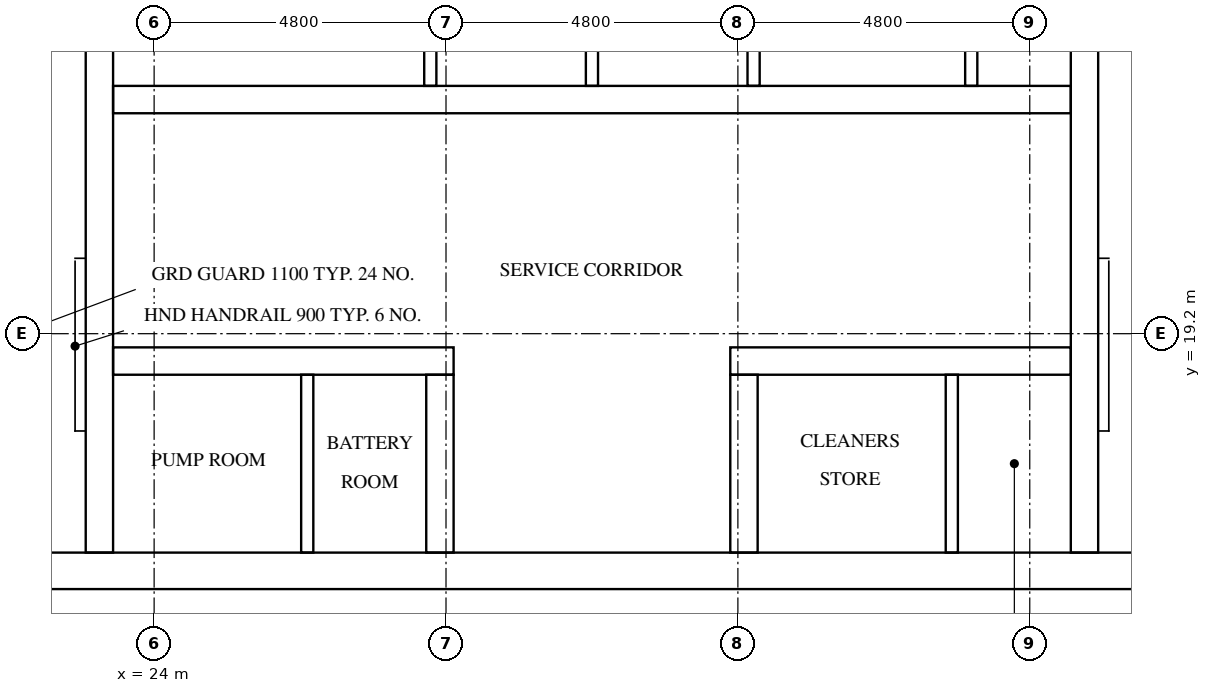
"""IFC4 building model, lengths in metres.
Left out: names, types, materials, properties, quantities, classifications, styles, units other than length and angle.
Written with IfcOpenShell. Run it as: python <this file> out.ifc"""

import sys

from ifc_helpers import new_model, si_unit, direction, frame, frame_2d, origin, place, context, subcontext, project, spatial, rectangle, extrude, element, fill, save


model = new_model("IFC4")
c1 = context("Model", 3, precision=1e-05, world=origin(), true_north=direction((0.0, 1.0)))
c2 = subcontext(c1, "Body", "Model", "MODEL_VIEW")
j1 = project(units=[si_unit("LENGTHUNIT", "METRE"), si_unit("PLANEANGLEUNIT", "RADIAN")], contexts=[c1])
p1 = place(None, origin())
s1 = spatial("IfcSite", under=j1, at=p1, CompositionType="ELEMENT")
p2 = place(p1, origin())
s2 = spatial("IfcBuilding", under=s1, at=p2, CompositionType="ELEMENT")
p3 = place(p2, frame((0.0, 0.0, 259.7)))
s3 = spatial("IfcBuildingStorey", under=s2, at=p3, CompositionType="ELEMENT", Elevation=259.7)
p4 = place(p3, frame((15.0, 15.3, 0.0), z_axis=(0.0, 0.0, 1.0), x_axis=(1.0, 0.0, 0.0)))
e1 = element("IfcWall", 1, at=p4, inside=s3, PredefinedType="SHEAR", context=c2, shape_type="SweptSolid", body=[
    extrude(rectangle(XDim=32.4, YDim=0.6, at=frame_2d((16.2, 0.0))), origin(), (0.0, 0.0, 1.0), 3.1),
])
p5 = place(p4, frame((15.3, 0.0, 0.0)))
e2 = element("IfcOpeningElement", 2, at=p5, cuts=e1, PredefinedType="OPENING", context=c2, shape_type="SweptSolid", body=[
    extrude(rectangle(XDim=1.8, YDim=2.1, at=frame_2d((0.9, 1.05))), frame((0.0, 0.31, 0.0), z_axis=(0.0, -1.0, 0.0), x_axis=(1.0, 0.0, 0.0)), (0.0, 0.0, 1.0), 0.62),
])
p6 = place(p3, frame((23.1, 15.6, 0.0), z_axis=(0.0, 0.0, 1.0), x_axis=(0.0, 1.0, 0.0)))
e3 = element("IfcWall", 3, at=p6, inside=s3, PredefinedType="SHEAR", context=c2, shape_type="SweptSolid", body=[
    extrude(rectangle(XDim=21.6, YDim=0.45, at=frame_2d((10.8, 0.0))), origin(), (0.0, 0.0, 1.0), 3.1),
])
p7 = place(p3, frame((39.3, 15.6, 0.0), z_axis=(0.0, 0.0, 1.0), x_axis=(0.0, 1.0, 0.0)))
e4 = element("IfcWall", 4, at=p7, inside=s3, PredefinedType="SHEAR", context=c2, shape_type="SweptSolid", body=[
    extrude(rectangle(XDim=8.65, YDim=0.45, at=frame_2d((4.325, 0.0))), origin(), (0.0, 0.0, 1.0), 3.1),
])
p8 = place(p3, frame((23.325, 18.75, 0.0), z_axis=(0.0, 0.0, 1.0), x_axis=(1.0, 0.0, 0.0)))
e5 = element("IfcWall", 5, at=p8, inside=s3, PredefinedType="SHEAR", context=c2, shape_type="SweptSolid", body=[
    extrude(rectangle(XDim=5.6, YDim=0.45, at=frame_2d((2.8, 0.0))), origin(), (0.0, 0.0, 1.0), 3.1),
])
p9 = place(p8, frame((1.046, 0.0, 0.0)))
e6 = element("IfcOpeningElement", 6, at=p9, cuts=e5, PredefinedType="OPENING", context=c2, shape_type="SweptSolid", body=[
    extrude(rectangle(XDim=1.0, YDim=2.1, at=frame_2d((0.5, 1.05))), frame((0.0, 0.235, 0.0), z_axis=(0.0, -1.0, 0.0), x_axis=(1.0, 0.0, 0.0)), (0.0, 0.0, 1.0), 0.47),
])
p10 = place(p8, frame((3.721, 0.0, 0.0)))
e7 = element("IfcOpeningElement", 7, at=p10, cuts=e5, PredefinedType="OPENING", context=c2, shape_type="SweptSolid", body=[
    extrude(rectangle(XDim=1.0, YDim=2.1, at=frame_2d((0.5, 1.05))), frame((0.0, 0.235, 0.0), z_axis=(0.0, -1.0, 0.0), x_axis=(1.0, 0.0, 0.0)), (0.0, 0.0, 1.0), 0.47),
])
p11 = place(p3, frame((33.475, 18.75, 0.0), z_axis=(0.0, 0.0, 1.0), x_axis=(1.0, 0.0, 0.0)))
e8 = element("IfcWall", 8, at=p11, inside=s3, PredefinedType="SHEAR", context=c2, shape_type="SweptSolid", body=[
    extrude(rectangle(XDim=5.6, YDim=0.45, at=frame_2d((2.8, 0.0))), origin(), (0.0, 0.0, 1.0), 3.1),
])
p12 = place(p11, frame((1.497, 0.0, 0.0)))
e9 = element("IfcOpeningElement", 9, at=p12, cuts=e8, PredefinedType="OPENING", context=c2, shape_type="SweptSolid", body=[
    extrude(rectangle(XDim=1.0, YDim=2.1, at=frame_2d((0.5, 1.05))), frame((0.0, 0.235, 0.0), z_axis=(0.0, -1.0, 0.0), x_axis=(1.0, 0.0, 0.0)), (0.0, 0.0, 1.0), 0.47),
])
p13 = place(p11, frame((4.171, 0.0, 0.0)))
e10 = element("IfcOpeningElement", 10, at=p13, cuts=e8, PredefinedType="OPENING", context=c2, shape_type="SweptSolid", body=[
    extrude(rectangle(XDim=1.0, YDim=2.1, at=frame_2d((0.5, 1.05))), frame((0.0, 0.235, 0.0), z_axis=(0.0, -1.0, 0.0), x_axis=(1.0, 0.0, 0.0)), (0.0, 0.0, 1.0), 0.47),
])
p14 = place(p3, frame((23.325, 23.05, 0.0), z_axis=(0.0, 0.0, 1.0), x_axis=(1.0, 0.0, 0.0)))
e11 = element("IfcWall", 11, at=p14, inside=s3, PredefinedType="SHEAR", context=c2, shape_type="SweptSolid", body=[
    extrude(rectangle(XDim=15.75, YDim=0.45, at=frame_2d((7.875, 0.0))), origin(), (0.0, 0.0, 1.0), 3.1),
])
p15 = place(p14, frame((2.058, 0.0, 0.0)))
e12 = element("IfcOpeningElement", 12, at=p15, cuts=e11, PredefinedType="OPENING", context=c2, shape_type="SweptSolid", body=[
    extrude(rectangle(XDim=1.0, YDim=2.1, at=frame_2d((0.5, 1.05))), frame((0.0, 0.235, 0.0), z_axis=(0.0, -1.0, 0.0), x_axis=(1.0, 0.0, 0.0)), (0.0, 0.0, 1.0), 0.47),
])
p16 = place(p14, frame((11.823, 0.0, 0.0)))
e13 = element("IfcOpeningElement", 13, at=p16, cuts=e11, PredefinedType="OPENING", context=c2, shape_type="SweptSolid", body=[
    extrude(rectangle(XDim=1.0, YDim=2.1, at=frame_2d((0.5, 1.05))), frame((0.0, 0.235, 0.0), z_axis=(0.0, -1.0, 0.0), x_axis=(1.0, 0.0, 0.0)), (0.0, 0.0, 1.0), 0.47),
])
p17 = place(p14, frame((14.481, 0.0, 0.0)))
e14 = element("IfcOpeningElement", 14, at=p17, cuts=e11, PredefinedType="OPENING", context=c2, shape_type="SweptSolid", body=[
    extrude(rectangle(XDim=1.0, YDim=2.1, at=frame_2d((0.5, 1.05))), frame((0.0, 0.235, 0.0), z_axis=(0.0, -1.0, 0.0), x_axis=(1.0, 0.0, 0.0)), (0.0, 0.0, 1.0), 0.47),
])
for number, where, z_axis, x_axis in (
    (15, (28.7, 15.6, 0.0), (0.0, 0.0, 1.0), (0.0, 1.0, 0.0)),
    (16, (33.7, 15.6, 0.0), (0.0, 0.0, 1.0), (0.0, 1.0, 0.0)),
):
    element("IfcWall", number, at=place(p3, frame(where, z_axis=z_axis, x_axis=x_axis)), inside=s3, PredefinedType="SHEAR", context=c2, shape_type="SweptSolid", body=[
        extrude(rectangle(XDim=2.925, YDim=0.45, at=frame_2d((1.462, 0.0))), origin(), (0.0, 0.0, 1.0), 3.1),
    ])
for number, where, z_axis, x_axis in (
    (17, (28.542, 23.275, 0.0), (0.0, 0.0, 1.0), (0.0, 1.0, 0.0)),
    (18, (31.2, 23.275, 0.0), (0.0, 0.0, 1.0), (0.0, 1.0, 0.0)),
    (19, (33.858, 23.275, 0.0), (0.0, 0.0, 1.0), (0.0, 1.0, 0.0)),
):
    element("IfcWall", number, at=place(p3, frame(where, z_axis=z_axis, x_axis=x_axis)), inside=s3, PredefinedType="SOLIDWALL", context=c2, shape_type="SweptSolid", body=[
        extrude(rectangle(XDim=2.65, YDim=0.2, at=frame_2d((1.325, 0.0))), origin(), (0.0, 0.0, 1.0), 3.1),
    ])
p18 = place(p3, frame((37.438, 23.275, 0.0), z_axis=(0.0, 0.0, 1.0), x_axis=(0.0, 1.0, 0.0)))
e20 = element("IfcWall", 20, at=p18, inside=s3, PredefinedType="PARTITIONING", context=c2, shape_type="SweptSolid", body=[
    extrude(rectangle(XDim=2.65, YDim=0.2, at=frame_2d((1.325, 0.0))), origin(), (0.0, 0.0, 1.0), 3.1),
])
for number, where, z_axis, x_axis in (
    (21, (26.518, 15.6, 0.0), (0.0, 0.0, 1.0), (0.0, 1.0, 0.0)),
    (22, (37.118, 15.6, 0.0), (0.0, 0.0, 1.0), (0.0, 1.0, 0.0)),
):
    element("IfcWall", number, at=place(p3, frame(where, z_axis=z_axis, x_axis=x_axis)), inside=s3, PredefinedType="PARTITIONING", context=c2, shape_type="SweptSolid", body=[
        extrude(rectangle(XDim=2.925, YDim=0.2, at=frame_2d((1.462, 0.0))), origin(), (0.0, 0.0, 1.0), 3.1),
    ])
p19 = place(p5, frame((1.8, 0.0, 0.0), z_axis=(0.0, 0.0, 1.0), x_axis=(-1.0, 0.0, 0.0)))
e23 = element("IfcDoor", 23, at=p19, inside=s3, OperationType="DOUBLE_DOOR_SINGLE_SWING", PredefinedType="DOOR", context=c2, shape_type="SweptSolid", body=[
    extrude(rectangle(XDim=1.8, YDim=2.1, at=frame_2d((0.9, 1.05))), frame((0.0, 0.025, 0.0), z_axis=(0.0, -1.0, 0.0), x_axis=(1.0, 0.0, 0.0)), (0.0, 0.0, 1.0), 0.05),
])
fill(e2, e23)
p20 = place(p15, frame((1.0, 0.0, 0.0), z_axis=(0.0, 0.0, 1.0), x_axis=(-1.0, 0.0, 0.0)))
e24 = element("IfcDoor", 24, at=p20, inside=s3, OperationType="SINGLE_SWING_LEFT", PredefinedType="DOOR", context=c2, shape_type="SweptSolid", body=[
    extrude(rectangle(XDim=1.0, YDim=2.1, at=frame_2d((0.5, 1.05))), frame((0.0, 0.025, 0.0), z_axis=(0.0, -1.0, 0.0), x_axis=(1.0, 0.0, 0.0)), (0.0, 0.0, 1.0), 0.05),
])
fill(e12, e24)
p21 = place(p16, frame((1.0, 0.0, 0.0), z_axis=(0.0, 0.0, 1.0), x_axis=(-1.0, 0.0, 0.0)))
e25 = element("IfcDoor", 25, at=p21, inside=s3, OperationType="SINGLE_SWING_RIGHT", PredefinedType="DOOR", context=c2, shape_type="SweptSolid", body=[
    extrude(rectangle(XDim=1.0, YDim=2.1, at=frame_2d((0.5, 1.05))), frame((0.0, 0.025, 0.0), z_axis=(0.0, -1.0, 0.0), x_axis=(1.0, 0.0, 0.0)), (0.0, 0.0, 1.0), 0.05),
])
fill(e13, e25)
p22 = place(p17, frame((1.0, 0.0, 0.0), z_axis=(0.0, 0.0, 1.0), x_axis=(-1.0, 0.0, 0.0)))
e26 = element("IfcDoor", 26, at=p22, inside=s3, OperationType="SINGLE_SWING_LEFT", PredefinedType="DOOR", context=c2, shape_type="SweptSolid", body=[
    extrude(rectangle(XDim=1.0, YDim=2.1, at=frame_2d((0.5, 1.05))), frame((0.0, 0.025, 0.0), z_axis=(0.0, -1.0, 0.0), x_axis=(1.0, 0.0, 0.0)), (0.0, 0.0, 1.0), 0.05),
])
fill(e14, e26)
p23 = place(p9, origin())
e27 = element("IfcDoor", 27, at=p23, inside=s3, OperationType="SINGLE_SWING_RIGHT", PredefinedType="DOOR", context=c2, shape_type="SweptSolid", body=[
    extrude(rectangle(XDim=1.0, YDim=2.1, at=frame_2d((0.5, 1.05))), frame((0.0, 0.025, 0.0), z_axis=(0.0, -1.0, 0.0), x_axis=(1.0, 0.0, 0.0)), (0.0, 0.0, 1.0), 0.05),
])
fill(e6, e27)
p24 = place(p10, origin())
e28 = element("IfcDoor", 28, at=p24, inside=s3, OperationType="SINGLE_SWING_LEFT", PredefinedType="DOOR", context=c2, shape_type="SweptSolid", body=[
    extrude(rectangle(XDim=1.0, YDim=2.1, at=frame_2d((0.5, 1.05))), frame((0.0, 0.025, 0.0), z_axis=(0.0, -1.0, 0.0), x_axis=(1.0, 0.0, 0.0)), (0.0, 0.0, 1.0), 0.05),
])
fill(e7, e28)
p25 = place(p12, origin())
e29 = element("IfcDoor", 29, at=p25, inside=s3, OperationType="SINGLE_SWING_RIGHT", PredefinedType="DOOR", context=c2, shape_type="SweptSolid", body=[
    extrude(rectangle(XDim=1.0, YDim=2.1, at=frame_2d((0.5, 1.05))), frame((0.0, 0.025, 0.0), z_axis=(0.0, -1.0, 0.0), x_axis=(1.0, 0.0, 0.0)), (0.0, 0.0, 1.0), 0.05),
])
fill(e9, e29)
p26 = place(p13, origin())
e30 = element("IfcDoor", 30, at=p26, inside=s3, OperationType="SINGLE_SWING_LEFT", PredefinedType="DOOR", context=c2, shape_type="SweptSolid", body=[
    extrude(rectangle(XDim=1.0, YDim=2.1, at=frame_2d((0.5, 1.05))), frame((0.0, 0.025, 0.0), z_axis=(0.0, -1.0, 0.0), x_axis=(1.0, 0.0, 0.0)), (0.0, 0.0, 1.0), 0.05),
])
fill(e10, e30)
save(model, sys.argv[1])
